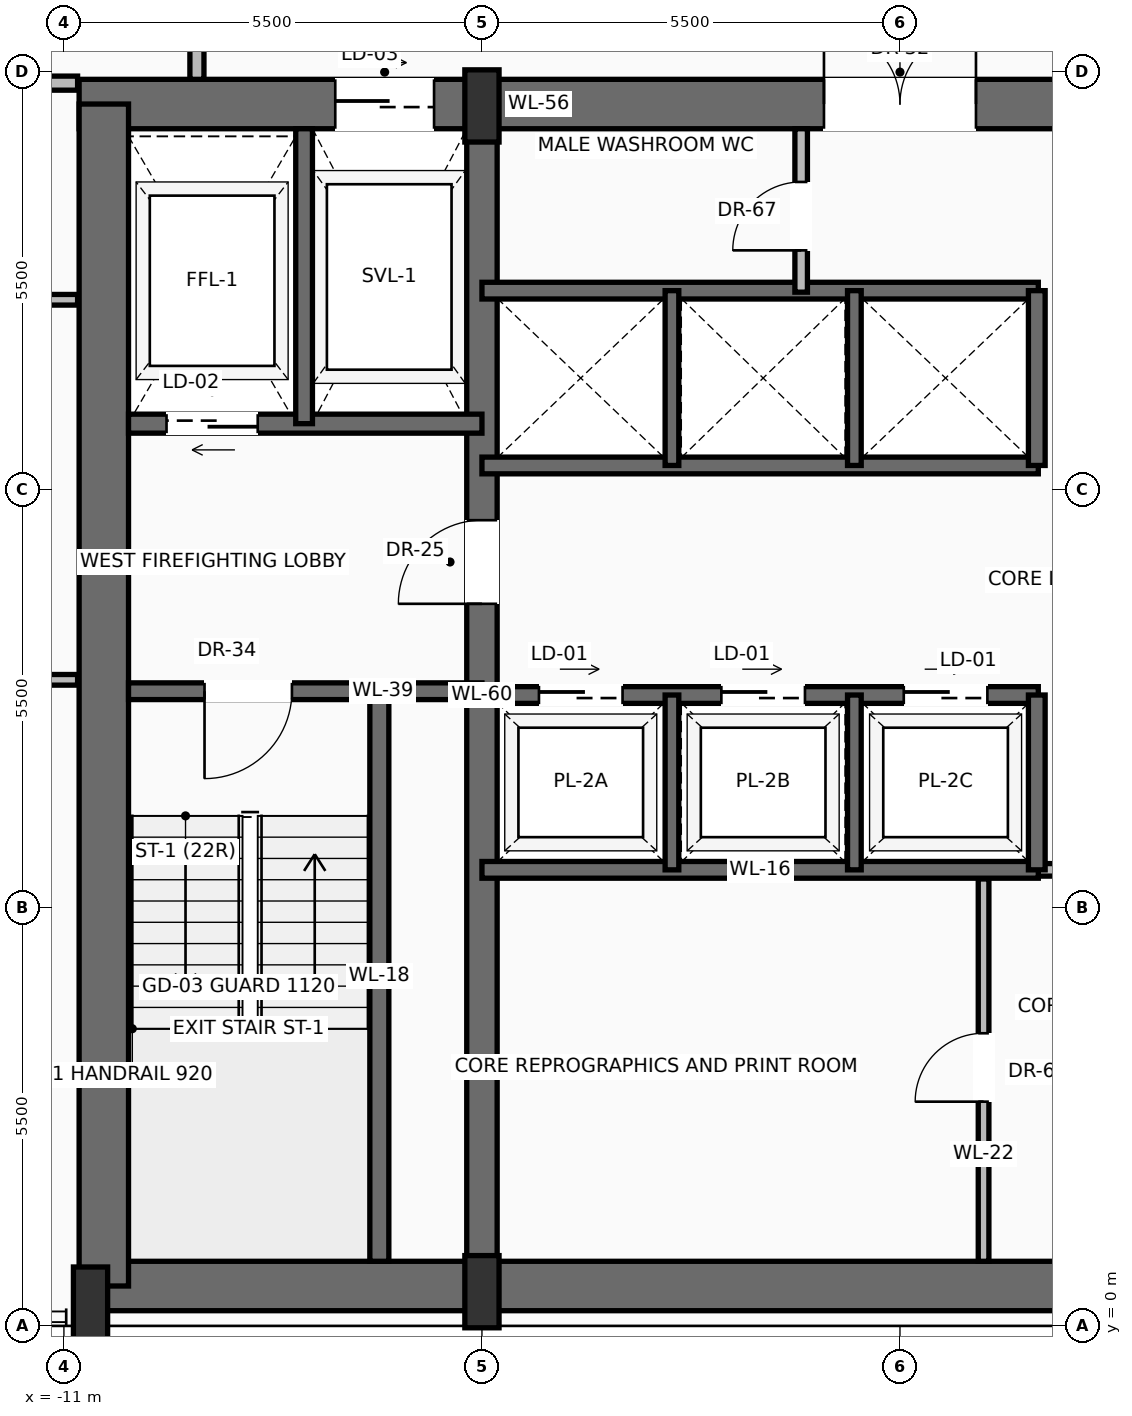
"""IFC4 building model, lengths in metres.
Left out: names, types, materials, properties, quantities, classifications, styles, units other than length and angle.
Written with IfcOpenShell. Run it as: python <this file> out.ifc"""

import sys

from ifc_helpers import new_model, si_unit, direction, frame, frame_2d, origin, origin_2d, place, context, subcontext, project, spatial, rectangle, extrude, source, transform, mapped, element, fill, save


model = new_model("IFC4")
c1 = context("Model", 3, precision=1e-05, world=origin(), true_north=direction((0.0, 1.0)))
c2 = subcontext(c1, "Body", "Model", "MODEL_VIEW")
j1 = project(units=[si_unit("LENGTHUNIT", "METRE"), si_unit("PLANEANGLEUNIT", "RADIAN")], contexts=[c1])
p1 = place(None, origin())
s1 = spatial("IfcSite", under=j1, at=p1, CompositionType="ELEMENT")
p2 = place(p1, origin())
s2 = spatial("IfcBuilding", under=s1, at=p2, CompositionType="ELEMENT")
p3 = place(p2, frame((0.0, 0.0, 133.0)))
s3 = spatial("IfcBuildingStorey", under=s2, at=p3, CompositionType="ELEMENT", Elevation=133.0)
p4 = place(p3, frame((-10.65, 0.525, 0.0), z_axis=(0.0, 0.0, 1.0), x_axis=(1.0, 0.0, 0.0)))
e1 = element("IfcWall", 1, at=p4, inside=s3, PredefinedType="SHEAR", context=c2, shape_type="SweptSolid", body=[
    extrude(rectangle(XDim=21.3, YDim=0.65, at=frame_2d((10.65, 0.0))), origin(), (0.0, 0.0, 1.0), 3.47),
])
p5 = place(p3, frame((-10.8, 16.075, 0.0), z_axis=(0.0, 0.0, 1.0), x_axis=(1.0, 0.0, 0.0)))
e2 = element("IfcWall", 2, at=p5, inside=s3, PredefinedType="SHEAR", context=c2, shape_type="SweptSolid", body=[
    extrude(rectangle(XDim=21.6, YDim=0.65, at=frame_2d((10.8, 0.0))), origin(), (0.0, 0.0, 1.0), 3.47),
])
p6 = place(p5, frame((3.37, 0.0, 0.0)))
e3 = element("IfcOpeningElement", 3, at=p6, cuts=e2, PredefinedType="OPENING", context=c2, shape_type="SweptSolid", body=[
    extrude(rectangle(XDim=1.3, YDim=2.3, at=frame_2d((0.65, 1.15))), frame((0.0, 0.335, 0.0), z_axis=(0.0, -1.0, 0.0), x_axis=(1.0, 0.0, 0.0)), (0.0, 0.0, 1.0), 0.67),
])
p7 = place(p5, frame((9.8, 0.0, 0.0)))
e4 = element("IfcOpeningElement", 4, at=p7, cuts=e2, PredefinedType="OPENING", context=c2, shape_type="SweptSolid", body=[
    extrude(rectangle(XDim=2.0, YDim=2.4, at=frame_2d((1.0, 1.2))), frame((0.0, 0.335, 0.0), z_axis=(0.0, -1.0, 0.0), x_axis=(1.0, 0.0, 0.0)), (0.0, 0.0, 1.0), 0.67),
])
p8 = place(p3, frame((-10.475, 0.525, 0.0), z_axis=(0.0, 0.0, 1.0), x_axis=(0.0, 1.0, 0.0)))
e5 = element("IfcWall", 5, at=p8, inside=s3, PredefinedType="SHEAR", context=c2, shape_type="SweptSolid", body=[
    extrude(rectangle(XDim=15.55, YDim=0.65, at=frame_2d((7.775, 0.0))), origin(), (0.0, 0.0, 1.0), 3.47),
])
p9 = place(p3, frame((-5.5, 0.525, 0.0), z_axis=(0.0, 0.0, 1.0), x_axis=(0.0, 1.0, 0.0)))
e6 = element("IfcWall", 6, at=p9, inside=s3, PredefinedType="SHEAR", context=c2, shape_type="SweptSolid", body=[
    extrude(rectangle(XDim=15.55, YDim=0.4, at=frame_2d((7.775, 0.0))), origin(), (0.0, 0.0, 1.0), 3.47),
])
p10 = place(p9, frame((8.975, 0.0, 0.0)))
e7 = element("IfcOpeningElement", 7, at=p10, cuts=e6, PredefinedType="OPENING", context=c2, shape_type="SweptSolid", body=[
    extrude(rectangle(XDim=1.1, YDim=2.2, at=frame_2d((0.55, 1.1))), frame((0.0, 0.21, 0.0), z_axis=(0.0, -1.0, 0.0), x_axis=(1.0, 0.0, 0.0)), (0.0, 0.0, 1.0), 0.42),
])
m1 = source(origin(), c2, "Body", "SweptSolid", [
    extrude(rectangle(XDim=0.45, YDim=0.95, at=origin_2d()), origin(), (0.0, 0.0, 1.0), 3.7),
])
for number, where, z_axis, x_axis in (
    (8, (-10.65, 0.3, 0.0), (0.0, 0.0, 1.0), (1.0, 0.0, 0.0)),
    (9, (-5.5, 0.45, 0.0), (0.0, 0.0, 1.0), (1.0, 0.0, 0.0)),
    (10, (-5.5, 16.05, 0.0), (0.0, 0.0, 1.0), (1.0, 0.0, 0.0)),
):
    element("IfcColumn", number, at=place(p3, frame(where, z_axis=z_axis, x_axis=x_axis)), inside=s3, PredefinedType="PILASTER", context=c2, shape_type="MappedRepresentation", body=[
        mapped(m1, transform((0.0, 0.0, 0.0), scale=1.0)),
    ])
p11 = place(p3, frame((-6.85, 0.85, 0.0), z_axis=(0.0, 0.0, 1.0), x_axis=(0.0, 1.0, 0.0)))
e11 = element("IfcWall", 11, at=p11, inside=s3, PredefinedType="SOLIDWALL", context=c2, shape_type="SweptSolid", body=[
    extrude(rectangle(XDim=7.5, YDim=0.25, at=frame_2d((3.75, 0.0))), origin(), (0.0, 0.0, 1.0), 3.47),
])
p12 = place(p3, frame((-5.5, 8.35, 0.0), z_axis=(0.0, 0.0, 1.0), x_axis=(-1.0, 0.0, 0.0)))
e12 = element("IfcWall", 12, at=p12, inside=s3, PredefinedType="SOLIDWALL", context=c2, shape_type="SweptSolid", body=[
    extrude(rectangle(XDim=4.65, YDim=0.22, at=frame_2d((2.325, 0.0))), origin(), (0.0, 0.0, 1.0), 3.47),
])
p13 = place(p12, frame((2.5, 0.0, 0.0)))
e13 = element("IfcOpeningElement", 13, at=p13, cuts=e12, PredefinedType="OPENING", context=c2, shape_type="SweptSolid", body=[
    extrude(rectangle(XDim=1.15, YDim=2.2, at=frame_2d((0.575, 1.1))), frame((0.0, 0.12, 0.0), z_axis=(0.0, -1.0, 0.0), x_axis=(1.0, 0.0, 0.0)), (0.0, 0.0, 1.0), 0.24),
])
p14 = place(p3, frame((-5.5, 11.87, 0.0), z_axis=(0.0, 0.0, 1.0), x_axis=(-1.0, 0.0, 0.0)))
e14 = element("IfcWall", 14, at=p14, inside=s3, PredefinedType="SOLIDWALL", context=c2, shape_type="SweptSolid", body=[
    extrude(rectangle(XDim=4.65, YDim=0.25, at=frame_2d((2.325, 0.0))), origin(), (0.0, 0.0, 1.0), 3.47),
])
p15 = place(p14, frame((2.95, 0.0, 0.0)))
e15 = element("IfcOpeningElement", 15, at=p15, cuts=e14, PredefinedType="OPENING", context=c2, shape_type="SweptSolid", body=[
    extrude(rectangle(XDim=1.2, YDim=2.25, at=frame_2d((0.6, 1.125))), frame((0.0, 0.135, 0.0), z_axis=(0.0, -1.0, 0.0), x_axis=(1.0, 0.0, 0.0)), (0.0, 0.0, 1.0), 0.27),
])
p16 = place(p3, frame((-7.84, 11.87, 0.0), z_axis=(0.0, 0.0, 1.0), x_axis=(0.0, 1.0, 0.0)))
e16 = element("IfcWall", 16, at=p16, inside=s3, PredefinedType="SOLIDWALL", context=c2, shape_type="SweptSolid", body=[
    extrude(rectangle(XDim=3.88, YDim=0.22, at=frame_2d((1.94, 0.0))), origin(), (0.0, 0.0, 1.0), 3.47),
])
p17 = place(p3, frame((1.82, 6.0, 0.0), z_axis=(0.0, 0.0, 1.0), x_axis=(1.0, 0.0, 0.0)))
e17 = element("IfcWall", 17, at=p17, inside=s3, PredefinedType="PARTITIONING", context=c2, shape_type="SweptSolid", body=[
    extrude(rectangle(XDim=3.48, YDim=0.165, at=frame_2d((1.74, 0.0))), origin(), (0.0, 0.0, 1.0), 3.462),
])
p18 = place(p17, frame((0.38, 0.0, 0.0)))
e18 = element("IfcOpeningElement", 18, at=p18, cuts=e17, PredefinedType="OPENING", context=c2, shape_type="SweptSolid", body=[
    extrude(rectangle(XDim=0.9, YDim=2.1, at=frame_2d((0.45, 1.05))), frame((0.0, 0.093, 0.0), z_axis=(0.0, -1.0, 0.0), x_axis=(1.0, 0.0, 0.0)), (0.0, 0.0, 1.0), 0.185),
])
p19 = place(p3, frame((1.1, 0.85, 0.0), z_axis=(0.0, 0.0, 1.0), x_axis=(0.0, 1.0, 0.0)))
e19 = element("IfcWall", 19, at=p19, inside=s3, PredefinedType="PARTITIONING", context=c2, shape_type="SweptSolid", body=[
    extrude(rectangle(XDim=5.03, YDim=0.14, at=frame_2d((2.515, 0.0))), origin(), (0.0, 0.0, 1.0), 3.462),
])
p20 = place(p19, frame((2.1, 0.0, 0.0)))
e20 = element("IfcOpeningElement", 20, at=p20, cuts=e19, PredefinedType="OPENING", context=c2, shape_type="SweptSolid", body=[
    extrude(rectangle(XDim=0.9, YDim=2.1, at=frame_2d((0.45, 1.05))), frame((0.0, 0.08, 0.0), z_axis=(0.0, -1.0, 0.0), x_axis=(1.0, 0.0, 0.0)), (0.0, 0.0, 1.0), 0.16),
])
p21 = place(p3, frame((-5.5, 6.0, 0.0), z_axis=(0.0, 0.0, 1.0), x_axis=(1.0, 0.0, 0.0)))
e21 = element("IfcWall", 21, at=p21, inside=s3, PredefinedType="SOLIDWALL", context=c2, shape_type="SweptSolid", body=[
    extrude(rectangle(XDim=7.32, YDim=0.22, at=frame_2d((3.66, 0.0))), origin(), (0.0, 0.0, 1.0), 3.47),
])
p22 = place(p3, frame((-5.5, 8.3, 0.0), z_axis=(0.0, 0.0, 1.0), x_axis=(1.0, 0.0, 0.0)))
e22 = element("IfcWall", 22, at=p22, inside=s3, PredefinedType="SOLIDWALL", context=c2, shape_type="SweptSolid", body=[
    extrude(rectangle(XDim=7.32, YDim=0.22, at=frame_2d((3.66, 0.0))), origin(), (0.0, 0.0, 1.0), 3.47),
])
p23 = place(p22, frame((0.75, 0.0, 0.0)))
e23 = element("IfcOpeningElement", 23, at=p23, cuts=e22, PredefinedType="OPENING", context=c2, shape_type="SweptSolid", body=[
    extrude(rectangle(XDim=1.1, YDim=2.2, at=frame_2d((0.55, 1.1))), frame((0.0, 0.12, 0.0), z_axis=(0.0, -1.0, 0.0), x_axis=(1.0, 0.0, 0.0)), (0.0, 0.0, 1.0), 0.24),
])
p24 = place(p22, frame((3.15, 0.0, 0.0)))
e24 = element("IfcOpeningElement", 24, at=p24, cuts=e22, PredefinedType="OPENING", context=c2, shape_type="SweptSolid", body=[
    extrude(rectangle(XDim=1.1, YDim=2.2, at=frame_2d((0.55, 1.1))), frame((0.0, 0.12, 0.0), z_axis=(0.0, -1.0, 0.0), x_axis=(1.0, 0.0, 0.0)), (0.0, 0.0, 1.0), 0.24),
])
p25 = place(p22, frame((5.55, 0.0, 0.0)))
e25 = element("IfcOpeningElement", 25, at=p25, cuts=e22, PredefinedType="OPENING", context=c2, shape_type="SweptSolid", body=[
    extrude(rectangle(XDim=1.1, YDim=2.2, at=frame_2d((0.55, 1.1))), frame((0.0, 0.12, 0.0), z_axis=(0.0, -1.0, 0.0), x_axis=(1.0, 0.0, 0.0)), (0.0, 0.0, 1.0), 0.24),
])
p26 = place(p3, frame((1.8, 6.0, 0.0), z_axis=(0.0, 0.0, 1.0), x_axis=(0.0, 1.0, 0.0)))
e26 = element("IfcWall", 26, at=p26, inside=s3, PredefinedType="SOLIDWALL", context=c2, shape_type="SweptSolid", body=[
    extrude(rectangle(XDim=2.3, YDim=0.22, at=frame_2d((1.15, 0.0))), origin(), (0.0, 0.0, 1.0), 3.47),
])
for number, where, z_axis, x_axis in (
    (27, (-3.0, 6.0, 0.0), (0.0, 0.0, 1.0), (0.0, 1.0, 0.0)),
    (28, (-0.6, 6.0, 0.0), (0.0, 0.0, 1.0), (0.0, 1.0, 0.0)),
):
    element("IfcWall", number, at=place(p3, frame(where, z_axis=z_axis, x_axis=x_axis)), inside=s3, PredefinedType="SOLIDWALL", context=c2, shape_type="SweptSolid", body=[
        extrude(rectangle(XDim=2.3, YDim=0.18, at=frame_2d((1.15, 0.0))), origin(), (0.0, 0.0, 1.0), 3.47),
    ])
for number, where, z_axis, x_axis in (
    (29, (-5.5, 11.32, 0.0), (0.0, 0.0, 1.0), (1.0, 0.0, 0.0)),
    (30, (-5.5, 13.62, 0.0), (0.0, 0.0, 1.0), (1.0, 0.0, 0.0)),
):
    element("IfcWall", number, at=place(p3, frame(where, z_axis=z_axis, x_axis=x_axis)), inside=s3, PredefinedType="SOLIDWALL", context=c2, shape_type="SweptSolid", body=[
        extrude(rectangle(XDim=7.32, YDim=0.22, at=frame_2d((3.66, 0.0))), origin(), (0.0, 0.0, 1.0), 3.47),
    ])
p27 = place(p3, frame((1.8, 11.32, 0.0), z_axis=(0.0, 0.0, 1.0), x_axis=(0.0, 1.0, 0.0)))
e31 = element("IfcWall", 31, at=p27, inside=s3, PredefinedType="SOLIDWALL", context=c2, shape_type="SweptSolid", body=[
    extrude(rectangle(XDim=2.3, YDim=0.22, at=frame_2d((1.15, 0.0))), origin(), (0.0, 0.0, 1.0), 3.47),
])
for number, where, z_axis, x_axis in (
    (32, (-3.0, 11.32, 0.0), (0.0, 0.0, 1.0), (0.0, 1.0, 0.0)),
    (33, (-0.6, 11.32, 0.0), (0.0, 0.0, 1.0), (0.0, 1.0, 0.0)),
):
    element("IfcWall", number, at=place(p3, frame(where, z_axis=z_axis, x_axis=x_axis)), inside=s3, PredefinedType="SOLIDWALL", context=c2, shape_type="SweptSolid", body=[
        extrude(rectangle(XDim=2.3, YDim=0.18, at=frame_2d((1.15, 0.0))), origin(), (0.0, 0.0, 1.0), 3.47),
    ])
p28 = place(p3, frame((-1.3, 13.6, 0.0), z_axis=(0.0, 0.0, 1.0), x_axis=(0.0, 1.0, 0.0)))
e34 = element("IfcWall", 34, at=p28, inside=s3, PredefinedType="PARTITIONING", context=c2, shape_type="SweptSolid", body=[
    extrude(rectangle(XDim=2.15, YDim=0.165, at=frame_2d((1.075, 0.0))), origin(), (0.0, 0.0, 1.0), 3.462),
])
p29 = place(p28, frame((0.55, 0.0, 0.0)))
e35 = element("IfcOpeningElement", 35, at=p29, cuts=e34, PredefinedType="OPENING", context=c2, shape_type="SweptSolid", body=[
    extrude(rectangle(XDim=0.9, YDim=2.1, at=frame_2d((0.45, 1.05))), frame((0.0, 0.093, 0.0), z_axis=(0.0, -1.0, 0.0), x_axis=(1.0, 0.0, 0.0)), (0.0, 0.0, 1.0), 0.185),
])
p30 = place(p3, frame((-9.25, 16.4, 0.0), z_axis=(0.0, 0.0, 1.0), x_axis=(0.0, 1.0, 0.0)))
e36 = element("IfcWall", 36, at=p30, inside=s3, PredefinedType="PARTITIONING", context=c2, shape_type="SweptSolid", body=[
    extrude(rectangle(XDim=9.0, YDim=0.185, at=frame_2d((4.5, 0.0))), origin(), (0.0, 0.0, 1.0), 2.846),
])
p31 = place(p30, frame((3.609, 0.0, 0.0)))
e37 = element("IfcOpeningElement", 37, at=p31, cuts=e36, PredefinedType="OPENING", context=c2, shape_type="SweptSolid", body=[
    extrude(rectangle(XDim=0.95, YDim=2.2, at=frame_2d((0.475, 1.1))), frame((0.0, 0.103, 0.0), z_axis=(0.0, -1.0, 0.0), x_axis=(1.0, 0.0, 0.0)), (0.0, 0.0, 1.0), 0.205),
])
p32 = place(p30, frame((6.385, 0.0, 0.0)))
e38 = element("IfcOpeningElement", 38, at=p32, cuts=e36, PredefinedType="OPENING", context=c2, shape_type="SweptSolid", body=[
    extrude(rectangle(XDim=0.95, YDim=2.2, at=frame_2d((0.475, 1.1))), frame((0.0, 0.103, 0.0), z_axis=(0.0, -1.0, 0.0), x_axis=(1.0, 0.0, 0.0)), (0.0, 0.0, 1.0), 0.205),
])
p33 = place(p3, frame((-21.877, 16.35, 0.0), z_axis=(0.0, 0.0, 1.0), x_axis=(1.0, 0.0, 0.0)))
e39 = element("IfcWall", 39, at=p33, inside=s3, PredefinedType="PARTITIONING", context=c2, shape_type="SweptSolid", body=[
    extrude(rectangle(XDim=11.057, YDim=0.185, at=frame_2d((5.528, 0.0))), origin(), (0.0, 0.0, 1.0), 3.462),
])
p34 = place(p33, frame((6.61, 0.0, 0.0)))
e40 = element("IfcOpeningElement", 40, at=p34, cuts=e39, PredefinedType="OPENING", context=c2, shape_type="SweptSolid", body=[
    extrude(rectangle(XDim=0.95, YDim=2.2, at=frame_2d((0.475, 1.1))), frame((0.0, 0.103, 0.0), z_axis=(0.0, -1.0, 0.0), x_axis=(1.0, 0.0, 0.0)), (0.0, 0.0, 1.0), 0.205),
])
p35 = place(p3, frame((-27.019, 8.5, 0.0), z_axis=(0.0, 0.0, 1.0), x_axis=(1.0, 0.0, 0.0)))
e41 = element("IfcWall", 41, at=p35, inside=s3, PredefinedType="PARTITIONING", context=c2, shape_type="SweptSolid", body=[
    extrude(rectangle(XDim=16.199, YDim=0.14, at=frame_2d((8.1, 0.0))), origin(), (0.0, 0.0, 1.0), 3.462),
])
p36 = place(p35, frame((7.635, 0.0, 0.0)))
e42 = element("IfcOpeningElement", 42, at=p36, cuts=e41, PredefinedType="OPENING", context=c2, shape_type="SweptSolid", body=[
    extrude(rectangle(XDim=0.95, YDim=2.2, at=frame_2d((0.475, 1.1))), frame((0.0, 0.08, 0.0), z_axis=(0.0, -1.0, 0.0), x_axis=(1.0, 0.0, 0.0)), (0.0, 0.0, 1.0), 0.16),
])
p37 = place(p3, frame((-23.744, 13.5, 0.0), z_axis=(0.0, 0.0, 1.0), x_axis=(1.0, 0.0, 0.0)))
e43 = element("IfcWall", 43, at=p37, inside=s3, PredefinedType="PARTITIONING", context=c2, shape_type="SweptSolid", body=[
    extrude(rectangle(XDim=12.924, YDim=0.14, at=frame_2d((6.462, 0.0))), origin(), (0.0, 0.0, 1.0), 3.049),
])
p38 = place(p37, frame((5.997, 0.0, 0.0)))
e44 = element("IfcOpeningElement", 44, at=p38, cuts=e43, PredefinedType="OPENING", context=c2, shape_type="SweptSolid", body=[
    extrude(rectangle(XDim=0.95, YDim=2.2, at=frame_2d((0.475, 1.1))), frame((0.0, 0.08, 0.0), z_axis=(0.0, -1.0, 0.0), x_axis=(1.0, 0.0, 0.0)), (0.0, 0.0, 1.0), 0.16),
])
m2 = source(origin(), c2, "Body", "SweptSolid", [
    extrude(rectangle(XDim=1.15, YDim=2.2, at=frame_2d((0.575, 1.1))), frame((0.0, 0.025, 0.0), z_axis=(0.0, -1.0, 0.0), x_axis=(1.0, 0.0, 0.0)), (0.0, 0.0, 1.0), 0.05),
])
p39 = place(p13, origin())
e45 = element("IfcDoor", 45, at=p39, inside=s3, OperationType="SINGLE_SWING_RIGHT", PredefinedType="DOOR", context=c2, shape_type="MappedRepresentation", body=[
    mapped(m2, transform((0.0, 0.0, 0.0), scale=1.0)),
])
fill(e13, e45)
m3 = source(origin(), c2, "Body", "SweptSolid", [
    extrude(rectangle(XDim=1.1, YDim=2.2, at=frame_2d((0.55, 1.1))), frame((0.0, 0.025, 0.0), z_axis=(0.0, -1.0, 0.0), x_axis=(1.0, 0.0, 0.0)), (0.0, 0.0, 1.0), 0.05),
])
p40 = place(p10, origin())
e46 = element("IfcDoor", 46, at=p40, inside=s3, OperationType="SINGLE_SWING_LEFT", PredefinedType="DOOR", context=c2, shape_type="MappedRepresentation", body=[
    mapped(m3, transform((0.0, 0.0, 0.0), scale=1.0)),
])
fill(e7, e46)
m4 = source(origin(), c2, "Body", "SweptSolid", [
    extrude(rectangle(XDim=1.2, YDim=2.25, at=frame_2d((0.6, 1.125))), frame((0.0, 0.025, 0.0), z_axis=(0.0, -1.0, 0.0), x_axis=(1.0, 0.0, 0.0)), (0.0, 0.0, 1.0), 0.05),
])
p41 = place(p15, origin())
e47 = element("IfcDoor", 47, at=p41, inside=s3, OperationType="SLIDING_TO_LEFT", PredefinedType="DOOR", context=c2, shape_type="MappedRepresentation", body=[
    mapped(m4, transform((0.0, 0.0, 0.0), scale=1.0)),
])
fill(e15, e47)
m5 = source(origin(), c2, "Body", "SweptSolid", [
    extrude(rectangle(XDim=1.3, YDim=2.3, at=frame_2d((0.65, 1.15))), frame((0.0, 0.025, 0.0), z_axis=(0.0, -1.0, 0.0), x_axis=(1.0, 0.0, 0.0)), (0.0, 0.0, 1.0), 0.05),
])
p42 = place(p6, origin())
e48 = element("IfcDoor", 48, at=p42, inside=s3, OperationType="SLIDING_TO_RIGHT", PredefinedType="DOOR", context=c2, shape_type="MappedRepresentation", body=[
    mapped(m5, transform((0.0, 0.0, 0.0), scale=1.0)),
])
fill(e3, e48)
m6 = source(origin(), c2, "Body", "SweptSolid", [
    extrude(rectangle(XDim=2.0, YDim=2.4, at=frame_2d((1.0, 1.2))), frame((0.0, 0.025, 0.0), z_axis=(0.0, -1.0, 0.0), x_axis=(1.0, 0.0, 0.0)), (0.0, 0.0, 1.0), 0.05),
])
p43 = place(p7, origin())
e49 = element("IfcDoor", 49, at=p43, inside=s3, OperationType="DOUBLE_DOOR_SINGLE_SWING", PredefinedType="DOOR", context=c2, shape_type="MappedRepresentation", body=[
    mapped(m6, transform((0.0, 0.0, 0.0), scale=1.0)),
])
fill(e4, e49)
m7 = source(origin(), c2, "Body", "SweptSolid", [
    extrude(rectangle(XDim=0.9, YDim=2.1, at=frame_2d((0.45, 1.05))), frame((0.0, 0.025, 0.0), z_axis=(0.0, -1.0, 0.0), x_axis=(1.0, 0.0, 0.0)), (0.0, 0.0, 1.0), 0.05),
])
p44 = place(p20, origin())
e50 = element("IfcDoor", 50, at=p44, inside=s3, OperationType="SINGLE_SWING_LEFT", PredefinedType="DOOR", context=c2, shape_type="MappedRepresentation", body=[
    mapped(m7, transform((0.0, 0.0, 0.0), scale=1.0)),
])
fill(e20, e50)
m8 = source(origin(), c2, "Body", "SweptSolid", [
    extrude(rectangle(XDim=1.1, YDim=2.2, at=frame_2d((0.55, 1.1))), frame((0.0, 0.025, 0.0), z_axis=(0.0, -1.0, 0.0), x_axis=(1.0, 0.0, 0.0)), (0.0, 0.0, 1.0), 0.05),
])
p45 = place(p23, origin())
e51 = element("IfcDoor", 51, at=p45, inside=s3, OperationType="SLIDING_TO_LEFT", PredefinedType="DOOR", context=c2, shape_type="MappedRepresentation", body=[
    mapped(m8, transform((0.0, 0.0, 0.0), scale=1.0)),
])
fill(e23, e51)
p46 = place(p24, origin())
e52 = element("IfcDoor", 52, at=p46, inside=s3, OperationType="SLIDING_TO_LEFT", PredefinedType="DOOR", context=c2, shape_type="MappedRepresentation", body=[
    mapped(m8, transform((0.0, 0.0, 0.0), scale=1.0)),
])
fill(e24, e52)
p47 = place(p25, origin())
e53 = element("IfcDoor", 53, at=p47, inside=s3, OperationType="SLIDING_TO_LEFT", PredefinedType="DOOR", context=c2, shape_type="MappedRepresentation", body=[
    mapped(m8, transform((0.0, 0.0, 0.0), scale=1.0)),
])
fill(e25, e53)
p48 = place(p29, origin())
e54 = element("IfcDoor", 54, at=p48, inside=s3, OperationType="SINGLE_SWING_LEFT", PredefinedType="DOOR", context=c2, shape_type="MappedRepresentation", body=[
    mapped(m7, transform((0.0, 0.0, 0.0), scale=1.0)),
])
fill(e35, e54)
save(model, sys.argv[1])
